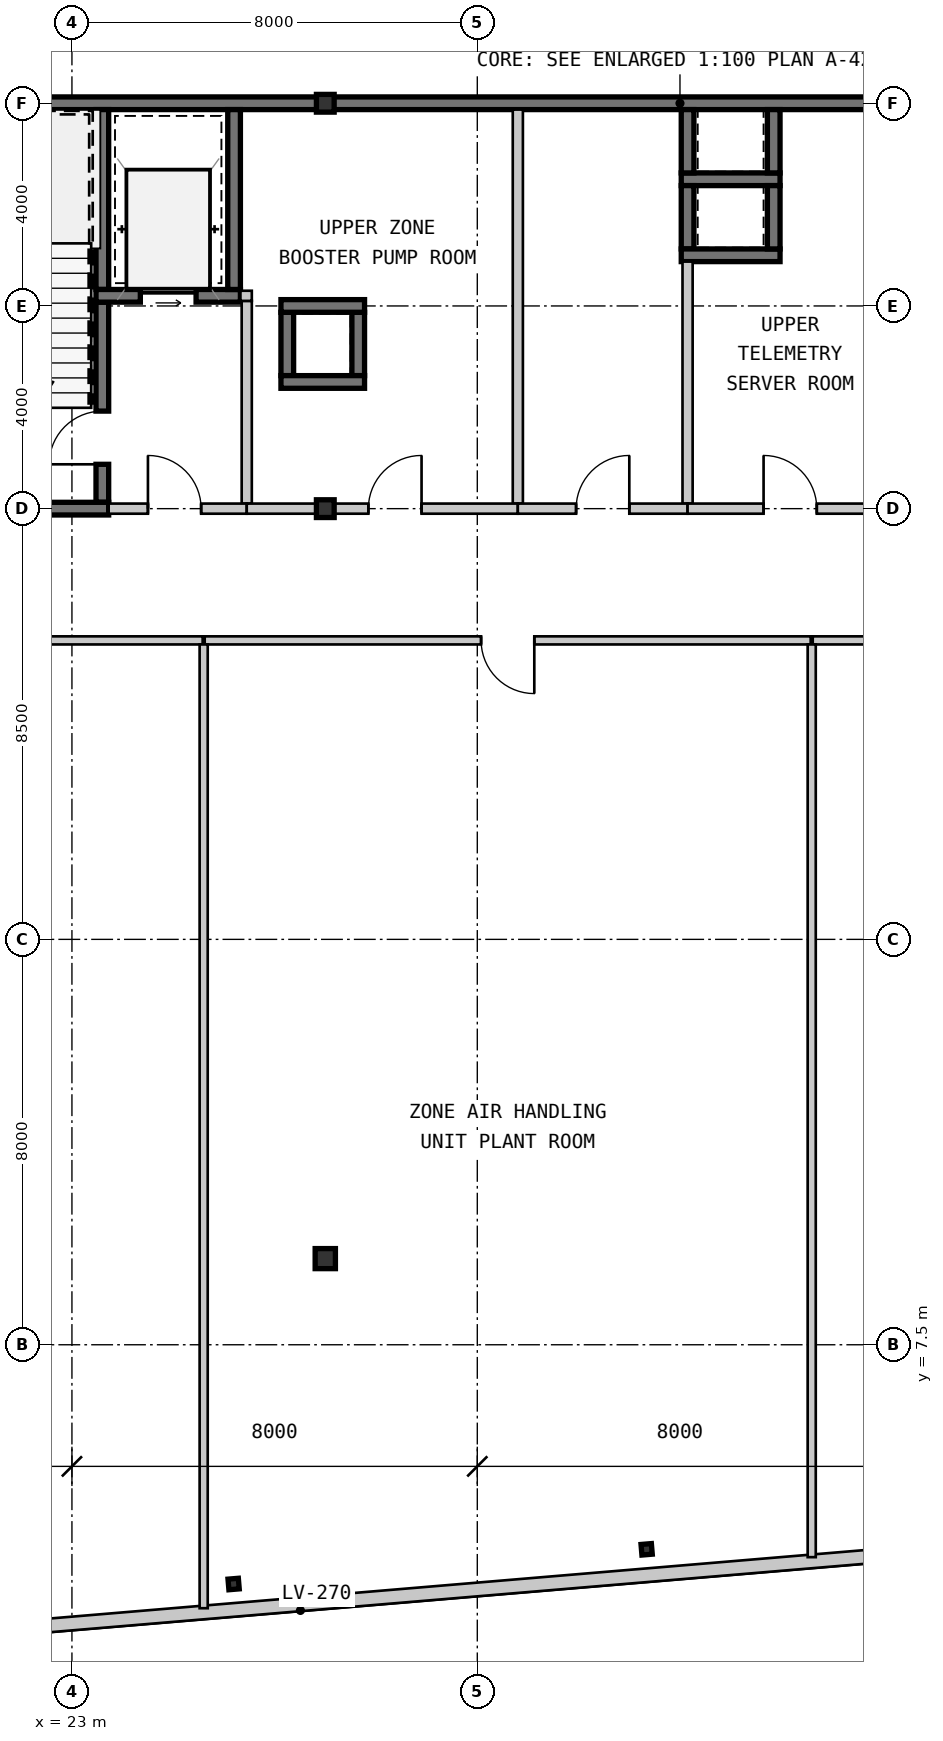
"""IFC4 building model, lengths in metres.
Left out: names, types, materials, properties, quantities, classifications, styles, units other than length and angle.
Written with IfcOpenShell. Run it as: python <this file> out.ifc"""

import sys

from ifc_helpers import new_model, si_unit, direction, frame, frame_2d, origin, origin_2d, place, context, subcontext, project, spatial, rectangle, hollow_rectangle, i_section, extrude, source, transform, mapped, element, fill, save


model = new_model("IFC4")
c1 = context("Model", 3, precision=1e-05, world=origin(), true_north=direction((0.0, 1.0)))
c2 = subcontext(c1, "Body", "Model", "MODEL_VIEW")
j1 = project(units=[si_unit("LENGTHUNIT", "METRE"), si_unit("PLANEANGLEUNIT", "RADIAN")], contexts=[c1])
p1 = place(None, origin())
s1 = spatial("IfcSite", under=j1, at=p1, CompositionType="ELEMENT")
p2 = place(p1, origin())
s2 = spatial("IfcBuilding", under=s1, at=p2, CompositionType="ELEMENT")
p3 = place(p2, frame((0.0, 0.0, 207.2)))
s3 = spatial("IfcBuildingStorey", under=s2, at=p3, CompositionType="ELEMENT", Elevation=207.2)
m1 = source(origin(), c2, "Body", "SweptSolid", [
    extrude(hollow_rectangle(XDim=0.35, YDim=0.35, WallThickness=0.016, at=origin_2d()), origin(), (0.0, 0.0, 1.0), 4.2),
])
for number, where, z_axis, x_axis in (
    (1, (28.0, 24.0, 0.0), (0.0, 0.0, 1.0), (1.0, 0.0, 0.0)),
    (2, (28.0, 32.0, 0.0), (0.0, 0.0, 1.0), (1.0, 0.0, 0.0)),
):
    element("IfcColumn", number, at=place(p3, frame(where, z_axis=z_axis, x_axis=x_axis)), inside=s3, PredefinedType="COLUMN", context=c2, shape_type="MappedRepresentation", body=[
        mapped(m1, transform((0.0, 0.0, 0.0), scale=1.0)),
    ])
m2 = source(origin(), c2, "Body", "SweptSolid", [
    extrude(i_section(OverallWidth=0.4, OverallDepth=0.396, WebThickness=0.022, FlangeThickness=0.034, at=origin_2d()), origin(), (0.0, 0.0, 1.0), 4.2),
])
p4 = place(p3, frame((28.0, 9.2, 0.0), z_axis=(0.0, 0.0, 1.0), x_axis=(1.0, 0.0, 0.0)))
e3 = element("IfcColumn", 3, at=p4, inside=s3, PredefinedType="COLUMN", context=c2, shape_type="MappedRepresentation", body=[
    mapped(m2, transform((0.0, 0.0, 0.0), scale=1.0)),
])
m3 = source(origin(), c2, "Body", "SweptSolid", [
    extrude(i_section(OverallWidth=0.205, OverallDepth=0.21, WebThickness=0.009, FlangeThickness=0.014, at=origin_2d()), origin(), (0.0, 0.0, 1.0), 4.2),
])
for number, where, z_axis, x_axis in (
    (4, (26.191, 2.779, 0.0), (0.0, 0.0, 1.0), (0.996, 0.084, 0.0)),
    (5, (34.342, 3.463, 0.0), (0.0, 0.0, 1.0), (0.996, 0.084, 0.0)),
):
    element("IfcColumn", number, at=place(p3, frame(where, z_axis=z_axis, x_axis=x_axis)), inside=s3, PredefinedType="COLUMN", context=c2, shape_type="MappedRepresentation", body=[
        mapped(m3, transform((0.0, 0.0, 0.0), scale=1.0)),
    ])
m4 = source(origin(), c2, "Body", "SweptSolid", [
    extrude(rectangle(XDim=37.323, YDim=0.27, at=frame_2d((18.661, 0.0))), origin(), (0.0, 0.0, 1.0), 3.78),
])
p5 = place(p3, frame((17.285, 1.519, 0.0), z_axis=(0.0, 0.0, 1.0), x_axis=(0.99649291123, 0.083677224315, 0.0)))
e6 = element("IfcWall", 6, at=p5, inside=s3, PredefinedType="SOLIDWALL", context=c2, shape_type="MappedRepresentation", body=[
    mapped(m4, transform((0.0, 0.0, 0.0), scale=1.0)),
])
m5 = source(origin(), c2, "Body", "SweptSolid", [
    extrude(rectangle(XDim=9.125, YDim=0.25, at=frame_2d((4.562, 0.0))), origin(), (0.0, 0.0, 1.0), 3.78),
])
p6 = place(p3, frame((18.875, 32.0, 0.0), z_axis=(0.0, 0.0, 1.0), x_axis=(1.0, 0.0, 0.0)))
e7 = element("IfcWall", 7, at=p6, inside=s3, PredefinedType="SHEAR", context=c2, shape_type="MappedRepresentation", body=[
    mapped(m5, transform((0.0, 0.0, 0.0), scale=1.0)),
])
m6 = source(origin(), c2, "Body", "SweptSolid", [
    extrude(rectangle(XDim=11.2, YDim=0.25, at=frame_2d((5.6, 0.0))), origin(), (0.0, 0.0, 1.0), 3.78),
])
p7 = place(p3, frame((28.0, 32.0, 0.0), z_axis=(0.0, 0.0, 1.0), x_axis=(1.0, 0.0, 0.0)))
e8 = element("IfcWall", 8, at=p7, inside=s3, PredefinedType="SHEAR", context=c2, shape_type="MappedRepresentation", body=[
    mapped(m6, transform((0.0, 0.0, 0.0), scale=1.0)),
])
m7 = source(origin(), c2, "Body", "SweptSolid", [
    extrude(rectangle(XDim=3.55, YDim=0.25, at=frame_2d((1.775, 0.0))), origin(), (0.0, 0.0, 1.0), 3.78),
])
p8 = place(p3, frame((23.6, 28.325, 0.0), z_axis=(0.0, 0.0, 1.0), x_axis=(0.0, 1.0, 0.0)))
e9 = element("IfcWall", 9, at=p8, inside=s3, PredefinedType="SHEAR", context=c2, shape_type="MappedRepresentation", body=[
    mapped(m7, transform((0.0, 0.0, 0.0), scale=1.0)),
])
m8 = source(origin(), c2, "Body", "SweptSolid", [
    extrude(rectangle(XDim=3.95, YDim=0.25, at=frame_2d((1.975, 0.0))), origin(), (0.0, 0.0, 1.0), 3.78),
])
p9 = place(p3, frame((23.6, 24.125, 0.0), z_axis=(0.0, 0.0, 1.0), x_axis=(0.0, 1.0, 0.0)))
e10 = element("IfcWall", 10, at=p9, inside=s3, PredefinedType="SHEAR", context=c2, shape_type="MappedRepresentation", body=[
    mapped(m8, transform((0.0, 0.0, 0.0), scale=1.0)),
])
m9 = source(origin(), c2, "Body", "SweptSolid", [
    extrude(rectangle(XDim=1.05, YDim=2.1, at=frame_2d((0.525, 1.05))), frame((0.0, 0.135, 0.0), z_axis=(0.0, -1.0, 0.0), x_axis=(1.0, 0.0, 0.0)), (0.0, 0.0, 1.0), 0.27),
])
p10 = place(p9, frame((0.75, 0.0, 0.0)))
e11 = element("IfcOpeningElement", 11, at=p10, cuts=e10, PredefinedType="OPENING", context=c2, shape_type="MappedRepresentation", body=[
    mapped(m9, transform((0.0, 0.0, 0.0), scale=1.0)),
])
m10 = source(origin(), c2, "Body", "SweptSolid", [
    extrude(rectangle(XDim=4.85, YDim=0.25, at=frame_2d((2.425, 0.0))), origin(), (0.0, 0.0, 1.0), 3.78),
])
p11 = place(p3, frame((18.875, 24.0, 0.0), z_axis=(0.0, 0.0, 1.0), x_axis=(1.0, 0.0, 0.0)))
e12 = element("IfcWall", 12, at=p11, inside=s3, PredefinedType="SHEAR", context=c2, shape_type="MappedRepresentation", body=[
    mapped(m10, transform((0.0, 0.0, 0.0), scale=1.0)),
])
m11 = source(origin(), c2, "Body", "SweptSolid", [
    extrude(rectangle(XDim=2.85, YDim=0.25, at=frame_2d((1.425, 0.0))), origin(), (0.0, 0.0, 1.0), 3.78),
])
p12 = place(p3, frame((23.475, 28.2, 0.0), z_axis=(0.0, 0.0, 1.0), x_axis=(1.0, 0.0, 0.0)))
e13 = element("IfcWall", 13, at=p12, inside=s3, PredefinedType="SHEAR", context=c2, shape_type="MappedRepresentation", body=[
    mapped(m11, transform((0.0, 0.0, 0.0), scale=1.0)),
])
m12 = source(origin(), c2, "Body", "SweptSolid", [
    extrude(rectangle(XDim=1.1, YDim=2.15, at=frame_2d((0.55, 1.075))), frame((0.0, 0.135, 0.0), z_axis=(0.0, -1.0, 0.0), x_axis=(1.0, 0.0, 0.0)), (0.0, 0.0, 1.0), 0.27),
])
p13 = place(p12, frame((0.875, 0.0, 0.0)))
e14 = element("IfcOpeningElement", 14, at=p13, cuts=e13, PredefinedType="OPENING", context=c2, shape_type="MappedRepresentation", body=[
    mapped(m12, transform((0.0, 0.0, 0.0), scale=1.0)),
])
p14 = place(p3, frame((26.2, 28.325, 0.0), z_axis=(0.0, 0.0, 1.0), x_axis=(0.0, 1.0, 0.0)))
e15 = element("IfcWall", 15, at=p14, inside=s3, PredefinedType="SHEAR", context=c2, shape_type="MappedRepresentation", body=[
    mapped(m7, transform((0.0, 0.0, 0.0), scale=1.0)),
])
m13 = source(origin(), c2, "Body", "SweptSolid", [
    extrude(rectangle(XDim=4.0, YDim=0.2, at=frame_2d((2.0, 0.0))), origin(), (0.0, 0.0, 1.0), 3.78),
])
p15 = place(p3, frame((26.45, 24.1, 0.0), z_axis=(0.0, 0.0, 1.0), x_axis=(0.0, 1.0, 0.0)))
e16 = element("IfcWall", 16, at=p15, inside=s3, PredefinedType="SOLIDWALL", context=c2, shape_type="MappedRepresentation", body=[
    mapped(m13, transform((0.0, 0.0, 0.0), scale=1.0)),
])
m14 = source(origin(), c2, "Body", "SweptSolid", [
    extrude(rectangle(XDim=2.725, YDim=0.2, at=frame_2d((1.362, 0.0))), origin(), (0.0, 0.0, 1.0), 3.32),
])
p16 = place(p3, frame((23.725, 24.0, 0.0), z_axis=(0.0, 0.0, 1.0), x_axis=(1.0, 0.0, 0.0)))
e17 = element("IfcWall", 17, at=p16, inside=s3, PredefinedType="SOLIDWALL", context=c2, shape_type="MappedRepresentation", body=[
    mapped(m14, transform((0.0, 0.0, 0.0), scale=1.0)),
])
m15 = source(origin(), c2, "Body", "SweptSolid", [
    extrude(rectangle(XDim=1.05, YDim=2.1, at=frame_2d((0.525, 1.05))), frame((0.0, 0.11, 0.0), z_axis=(0.0, -1.0, 0.0), x_axis=(1.0, 0.0, 0.0)), (0.0, 0.0, 1.0), 0.22),
])
p17 = place(p16, frame((0.775, 0.0, 0.0)))
e18 = element("IfcOpeningElement", 18, at=p17, cuts=e17, PredefinedType="OPENING", context=c2, shape_type="MappedRepresentation", body=[
    mapped(m15, transform((0.0, 0.0, 0.0), scale=1.0)),
])
m16 = source(origin(), c2, "Body", "SweptSolid", [
    extrude(rectangle(XDim=1.95, YDim=0.25, at=frame_2d((0.975, 0.0))), origin(), (0.0, 0.0, 1.0), 3.78),
])
p18 = place(p3, frame((35.025, 30.5, 0.0), z_axis=(0.0, 0.0, 1.0), x_axis=(1.0, 0.0, 0.0)))
e19 = element("IfcWall", 19, at=p18, inside=s3, PredefinedType="SHEAR", context=c2, shape_type="MappedRepresentation", body=[
    mapped(m16, transform((0.0, 0.0, 0.0), scale=1.0)),
])
m17 = source(origin(), c2, "Body", "SweptSolid", [
    extrude(rectangle(XDim=1.25, YDim=0.25, at=frame_2d((0.625, 0.0))), origin(), (0.0, 0.0, 1.0), 3.78),
])
for number, where, z_axis, x_axis in (
    (20, (35.15, 31.875, 0.0), (0.0, 0.0, 1.0), (0.0, -1.0, 0.0)),
    (21, (36.85, 30.625, 0.0), (0.0, 0.0, 1.0), (0.0, 1.0, 0.0)),
    (22, (35.15, 30.375, 0.0), (0.0, 0.0, 1.0), (0.0, -1.0, 0.0)),
):
    element("IfcWall", number, at=place(p3, frame(where, z_axis=z_axis, x_axis=x_axis)), inside=s3, PredefinedType="SHEAR", context=c2, shape_type="MappedRepresentation", body=[
        mapped(m17, transform((0.0, 0.0, 0.0), scale=1.0)),
    ])
p19 = place(p3, frame((35.025, 29.0, 0.0), z_axis=(0.0, 0.0, 1.0), x_axis=(1.0, 0.0, 0.0)))
e23 = element("IfcWall", 23, at=p19, inside=s3, PredefinedType="SHEAR", context=c2, shape_type="MappedRepresentation", body=[
    mapped(m16, transform((0.0, 0.0, 0.0), scale=1.0)),
])
for number, where, z_axis, x_axis in (
    (24, (36.85, 29.125, 0.0), (0.0, 0.0, 1.0), (0.0, 1.0, 0.0)),
    (25, (28.65, 26.625, 0.0), (0.0, 0.0, 1.0), (0.0, 1.0, 0.0)),
    (26, (27.25, 27.875, 0.0), (0.0, 0.0, 1.0), (0.0, -1.0, 0.0)),
):
    element("IfcWall", number, at=place(p3, frame(where, z_axis=z_axis, x_axis=x_axis)), inside=s3, PredefinedType="SHEAR", context=c2, shape_type="MappedRepresentation", body=[
        mapped(m17, transform((0.0, 0.0, 0.0), scale=1.0)),
    ])
m18 = source(origin(), c2, "Body", "SweptSolid", [
    extrude(rectangle(XDim=1.65, YDim=0.25, at=frame_2d((0.825, 0.0))), origin(), (0.0, 0.0, 1.0), 3.78),
])
for number, where, z_axis, x_axis in (
    (27, (28.775, 28.0, 0.0), (0.0, 0.0, 1.0), (-1.0, 0.0, 0.0)),
    (28, (27.125, 26.5, 0.0), (0.0, 0.0, 1.0), (1.0, 0.0, 0.0)),
):
    element("IfcWall", number, at=place(p3, frame(where, z_axis=z_axis, x_axis=x_axis)), inside=s3, PredefinedType="SHEAR", context=c2, shape_type="MappedRepresentation", body=[
        mapped(m18, transform((0.0, 0.0, 0.0), scale=1.0)),
    ])
m19 = source(origin(), c2, "Body", "SweptSolid", [
    extrude(rectangle(XDim=7.775, YDim=0.2, at=frame_2d((3.887, 0.0))), origin(), (0.0, 0.0, 1.0), 3.78),
])
p20 = place(p3, frame((31.8, 31.875, 0.0), z_axis=(0.0, 0.0, 1.0), x_axis=(0.0, -1.0, 0.0)))
e29 = element("IfcWall", 29, at=p20, inside=s3, PredefinedType="SOLIDWALL", context=c2, shape_type="MappedRepresentation", body=[
    mapped(m19, transform((0.0, 0.0, 0.0), scale=1.0)),
])
m20 = source(origin(), c2, "Body", "SweptSolid", [
    extrude(rectangle(XDim=5.35, YDim=0.2, at=frame_2d((2.675, 0.0))), origin(), (0.0, 0.0, 1.0), 3.32),
])
p21 = place(p3, frame((31.8, 24.0, 0.0), z_axis=(0.0, 0.0, 1.0), x_axis=(-1.0, 0.0, 0.0)))
e30 = element("IfcWall", 30, at=p21, inside=s3, PredefinedType="SOLIDWALL", context=c2, shape_type="MappedRepresentation", body=[
    mapped(m20, transform((0.0, 0.0, 0.0), scale=1.0)),
])
p22 = place(p21, frame((1.9, 0.0, 0.0)))
e31 = element("IfcOpeningElement", 31, at=p22, cuts=e30, PredefinedType="OPENING", context=c2, shape_type="MappedRepresentation", body=[
    mapped(m15, transform((0.0, 0.0, 0.0), scale=1.0)),
])
m21 = source(origin(), c2, "Body", "SweptSolid", [
    extrude(rectangle(XDim=4.775, YDim=0.2, at=frame_2d((2.387, 0.0))), origin(), (0.0, 0.0, 1.0), 3.78),
])
p23 = place(p3, frame((35.15, 28.875, 0.0), z_axis=(0.0, 0.0, 1.0), x_axis=(0.0, -1.0, 0.0)))
e32 = element("IfcWall", 32, at=p23, inside=s3, PredefinedType="SOLIDWALL", context=c2, shape_type="MappedRepresentation", body=[
    mapped(m21, transform((0.0, 0.0, 0.0), scale=1.0)),
])
m22 = source(origin(), c2, "Body", "SweptSolid", [
    extrude(rectangle(XDim=3.35, YDim=0.2, at=frame_2d((1.675, 0.0))), origin(), (0.0, 0.0, 1.0), 3.32),
])
p24 = place(p3, frame((35.15, 24.0, 0.0), z_axis=(0.0, 0.0, 1.0), x_axis=(-1.0, 0.0, 0.0)))
e33 = element("IfcWall", 33, at=p24, inside=s3, PredefinedType="SOLIDWALL", context=c2, shape_type="MappedRepresentation", body=[
    mapped(m22, transform((0.0, 0.0, 0.0), scale=1.0)),
])
p25 = place(p24, frame((1.15, 0.0, 0.0)))
e34 = element("IfcOpeningElement", 34, at=p25, cuts=e33, PredefinedType="OPENING", context=c2, shape_type="MappedRepresentation", body=[
    mapped(m15, transform((0.0, 0.0, 0.0), scale=1.0)),
])
m23 = source(origin(), c2, "Body", "SweptSolid", [
    extrude(rectangle(XDim=4.05, YDim=0.2, at=frame_2d((2.025, 0.0))), origin(), (0.0, 0.0, 1.0), 3.32),
])
p26 = place(p3, frame((39.2, 24.0, 0.0), z_axis=(0.0, 0.0, 1.0), x_axis=(-1.0, 0.0, 0.0)))
e35 = element("IfcWall", 35, at=p26, inside=s3, PredefinedType="SOLIDWALL", context=c2, shape_type="MappedRepresentation", body=[
    mapped(m23, transform((0.0, 0.0, 0.0), scale=1.0)),
])
p27 = place(p26, frame((1.5, 0.0, 0.0)))
e36 = element("IfcOpeningElement", 36, at=p27, cuts=e35, PredefinedType="OPENING", context=c2, shape_type="MappedRepresentation", body=[
    mapped(m15, transform((0.0, 0.0, 0.0), scale=1.0)),
])
m24 = source(origin(), c2, "Body", "SweptSolid", [
    extrude(rectangle(XDim=12.751, YDim=0.16, at=frame_2d((6.375, 0.0))), origin(), (0.0, 0.0, 1.0), 3.78),
])
p28 = place(p3, frame((25.58, 21.4, 0.0), z_axis=(0.0, 0.0, 1.0), x_axis=(-1.0, 0.0, 0.0)))
e37 = element("IfcWall", 37, at=p28, inside=s3, PredefinedType="PARTITIONING", context=c2, shape_type="MappedRepresentation", body=[
    mapped(m24, transform((0.0, 0.0, 0.0), scale=1.0)),
])
m25 = source(origin(), c2, "Body", "SweptSolid", [
    extrude(rectangle(XDim=1.05, YDim=2.1, at=frame_2d((0.525, 1.05))), frame((0.0, 0.09, 0.0), z_axis=(0.0, -1.0, 0.0), x_axis=(1.0, 0.0, 0.0)), (0.0, 0.0, 1.0), 0.18),
])
p29 = place(p28, frame((4.6, 0.0, 0.0)))
e38 = element("IfcOpeningElement", 38, at=p29, cuts=e37, PredefinedType="OPENING", context=c2, shape_type="MappedRepresentation", body=[
    mapped(m25, transform((0.0, 0.0, 0.0), scale=1.0)),
])
m26 = source(origin(), c2, "Body", "SweptSolid", [
    extrude(rectangle(XDim=11.96, YDim=0.16, at=frame_2d((5.98, 0.0))), origin(), (0.0, 0.0, 1.0), 3.78),
])
p30 = place(p3, frame((37.58, 21.4, 0.0), z_axis=(0.0, 0.0, 1.0), x_axis=(-1.0, 0.0, 0.0)))
e39 = element("IfcWall", 39, at=p30, inside=s3, PredefinedType="PARTITIONING", context=c2, shape_type="MappedRepresentation", body=[
    mapped(m26, transform((0.0, 0.0, 0.0), scale=1.0)),
])
p31 = place(p30, frame((5.455, 0.0, 0.0)))
e40 = element("IfcOpeningElement", 40, at=p31, cuts=e39, PredefinedType="OPENING", context=c2, shape_type="MappedRepresentation", body=[
    mapped(m25, transform((0.0, 0.0, 0.0), scale=1.0)),
])
p32 = place(p3, frame((49.58, 21.4, 0.0), z_axis=(0.0, 0.0, 1.0), x_axis=(-1.0, 0.0, 0.0)))
e41 = element("IfcWall", 41, at=p32, inside=s3, PredefinedType="PARTITIONING", context=c2, shape_type="MappedRepresentation", body=[
    mapped(m26, transform((0.0, 0.0, 0.0), scale=1.0)),
])
p33 = place(p32, frame((5.455, 0.0, 0.0)))
e42 = element("IfcOpeningElement", 42, at=p33, cuts=e41, PredefinedType="OPENING", context=c2, shape_type="MappedRepresentation", body=[
    mapped(m25, transform((0.0, 0.0, 0.0), scale=1.0)),
])
m27 = source(origin(), c2, "Body", "SweptSolid", [
    extrude(rectangle(XDim=19.019, YDim=0.16, at=frame_2d((9.51, 0.0))), origin(), (0.0, 0.0, 1.0), 3.78),
])
p34 = place(p3, frame((25.6, 21.32, 0.0), z_axis=(0.0, 0.0, 1.0), x_axis=(0.0, -1.0, 0.0)))
e43 = element("IfcWall", 43, at=p34, inside=s3, PredefinedType="PARTITIONING", context=c2, shape_type="MappedRepresentation", body=[
    mapped(m27, transform((0.0, 0.0, 0.0), scale=1.0)),
])
m28 = source(origin(), c2, "Body", "SweptSolid", [
    extrude(rectangle(XDim=18.012, YDim=0.16, at=frame_2d((9.006, 0.0))), origin(), (0.0, 0.0, 1.0), 3.78),
])
p35 = place(p3, frame((37.6, 21.32, 0.0), z_axis=(0.0, 0.0, 1.0), x_axis=(0.0, -1.0, 0.0)))
e44 = element("IfcWall", 44, at=p35, inside=s3, PredefinedType="PARTITIONING", context=c2, shape_type="MappedRepresentation", body=[
    mapped(m28, transform((0.0, 0.0, 0.0), scale=1.0)),
])
m29 = source(origin(), c2, "Body", "SweptSolid", [
    extrude(rectangle(XDim=0.225, YDim=0.2, at=frame_2d((0.113, 0.0))), origin(), (0.0, 0.0, 1.0), 3.78),
])
p36 = place(p3, frame((26.325, 28.2, 0.0), z_axis=(0.0, 0.0, 1.0), x_axis=(1.0, 0.0, 0.0)))
e45 = element("IfcWall", 45, at=p36, inside=s3, PredefinedType="SOLIDWALL", context=c2, shape_type="MappedRepresentation", body=[
    mapped(m29, transform((0.0, 0.0, 0.0), scale=1.0)),
])
m30 = source(origin(), c2, "Body", "SweptSolid", [
    extrude(rectangle(XDim=1.05, YDim=2.1, at=frame_2d((0.525, 1.05))), frame((0.0, 0.025, 0.0), z_axis=(0.0, -1.0, 0.0), x_axis=(1.0, 0.0, 0.0)), (0.0, 0.0, 1.0), 0.05),
])
p37 = place(p10, origin())
e46 = element("IfcDoor", 46, at=p37, inside=s3, OperationType="SINGLE_SWING_LEFT", PredefinedType="DOOR", context=c2, shape_type="MappedRepresentation", body=[
    mapped(m30, transform((0.0, 0.0, 0.0), scale=1.0)),
])
fill(e11, e46)
m31 = source(origin(), c2, "Body", "SweptSolid", [
    extrude(rectangle(XDim=1.1, YDim=2.15, at=frame_2d((0.55, 1.075))), frame((0.0, 0.025, 0.0), z_axis=(0.0, -1.0, 0.0), x_axis=(1.0, 0.0, 0.0)), (0.0, 0.0, 1.0), 0.05),
])
p38 = place(p13, origin())
e47 = element("IfcDoor", 47, at=p38, inside=s3, OperationType="SLIDING_TO_LEFT", PredefinedType="DOOR", context=c2, shape_type="MappedRepresentation", body=[
    mapped(m31, transform((0.0, 0.0, 0.0), scale=1.0)),
])
fill(e14, e47)
p39 = place(p17, origin())
e48 = element("IfcDoor", 48, at=p39, inside=s3, OperationType="SINGLE_SWING_LEFT", PredefinedType="DOOR", context=c2, shape_type="MappedRepresentation", body=[
    mapped(m30, transform((0.0, 0.0, 0.0), scale=1.0)),
])
fill(e18, e48)
p40 = place(p22, frame((1.05, 0.0, 0.0), z_axis=(0.0, 0.0, 1.0), x_axis=(-1.0, 0.0, 0.0)))
e49 = element("IfcDoor", 49, at=p40, inside=s3, OperationType="SINGLE_SWING_RIGHT", PredefinedType="DOOR", context=c2, shape_type="MappedRepresentation", body=[
    mapped(m30, transform((0.0, 0.0, 0.0), scale=1.0)),
])
fill(e31, e49)
p41 = place(p25, frame((1.05, 0.0, 0.0), z_axis=(0.0, 0.0, 1.0), x_axis=(-1.0, 0.0, 0.0)))
e50 = element("IfcDoor", 50, at=p41, inside=s3, OperationType="SINGLE_SWING_RIGHT", PredefinedType="DOOR", context=c2, shape_type="MappedRepresentation", body=[
    mapped(m30, transform((0.0, 0.0, 0.0), scale=1.0)),
])
fill(e34, e50)
p42 = place(p27, frame((1.05, 0.0, 0.0), z_axis=(0.0, 0.0, 1.0), x_axis=(-1.0, 0.0, 0.0)))
e51 = element("IfcDoor", 51, at=p42, inside=s3, OperationType="SINGLE_SWING_LEFT", PredefinedType="DOOR", context=c2, shape_type="MappedRepresentation", body=[
    mapped(m30, transform((0.0, 0.0, 0.0), scale=1.0)),
])
fill(e36, e51)
p43 = place(p31, origin())
e52 = element("IfcDoor", 52, at=p43, inside=s3, OperationType="SINGLE_SWING_LEFT", PredefinedType="DOOR", context=c2, shape_type="MappedRepresentation", body=[
    mapped(m30, transform((0.0, 0.0, 0.0), scale=1.0)),
])
fill(e40, e52)
save(model, sys.argv[1])
